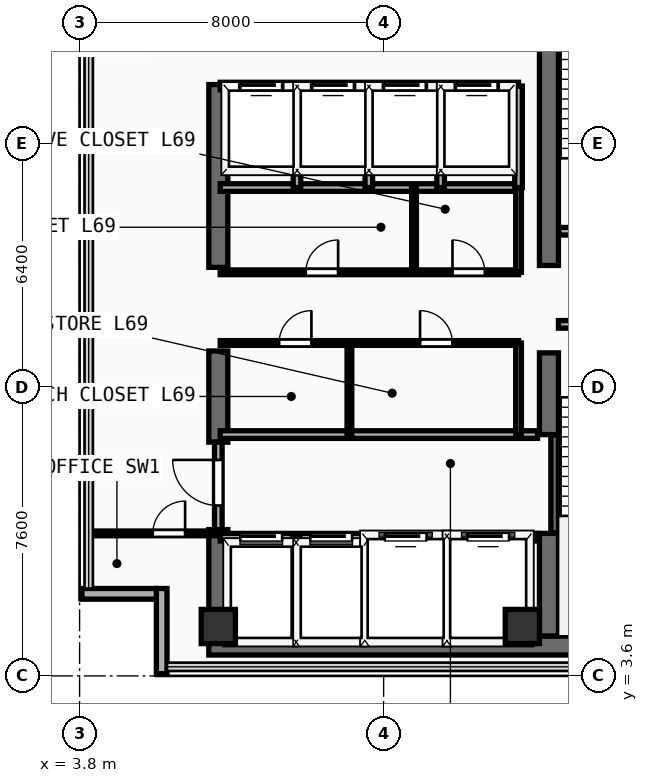
"""IFC4 building model, lengths in metres.
Left out: names, types, materials, properties, quantities, classifications, styles, units other than length and angle.
Written with IfcOpenShell. Run it as: python <this file> out.ifc"""

import sys

from ifc_helpers import new_model, si_unit, direction, frame, frame_2d, origin, origin_2d, place, context, subcontext, project, spatial, rectangle, extrude, element, fill, save


model = new_model("IFC4")
c1 = context("Model", 3, precision=1e-05, world=origin(), true_north=direction((0.0, 1.0)))
c2 = subcontext(c1, "Body", "Model", "MODEL_VIEW")
j1 = project(units=[si_unit("LENGTHUNIT", "METRE"), si_unit("PLANEANGLEUNIT", "RADIAN")], contexts=[c1])
p1 = place(None, origin())
s1 = spatial("IfcSite", under=j1, at=p1, CompositionType="ELEMENT")
p2 = place(p1, origin())
s2 = spatial("IfcBuilding", under=s1, at=p2, CompositionType="ELEMENT")
p3 = place(p2, frame((0.0, 0.0, 270.4)))
s3 = spatial("IfcBuildingStorey", under=s2, at=p3, CompositionType="ELEMENT", Elevation=270.4)
p4 = place(p3, frame((7.2, 4.4, 0.0), z_axis=(0.0, 0.0, 1.0), x_axis=(1.0, 0.0, 0.0)))
e1 = element("IfcWall", 1, at=p4, inside=s3, PredefinedType="SHEAR", context=c2, shape_type="SweptSolid", body=[
    extrude(rectangle(XDim=13.85, YDim=0.5, at=frame_2d((6.925, 0.0))), origin(), (0.0, 0.0, 1.0), 3.56),
])
p5 = place(p3, frame((7.45, 4.65, 0.0), z_axis=(0.0, 0.0, 1.0), x_axis=(0.0, 1.0, 0.0)))
e2 = element("IfcWall", 2, at=p5, inside=s3, PredefinedType="SHEAR", context=c2, shape_type="SweptSolid", body=[
    extrude(rectangle(XDim=2.8, YDim=0.5, at=frame_2d((1.4, 0.0))), origin(), (0.0, 0.0, 1.0), 3.56),
])
p6 = place(p3, frame((7.45, 9.75, 0.0), z_axis=(0.0, 0.0, 1.0), x_axis=(0.0, 1.0, 0.0)))
e3 = element("IfcWall", 3, at=p6, inside=s3, PredefinedType="SHEAR", context=c2, shape_type="SweptSolid", body=[
    extrude(rectangle(XDim=2.4, YDim=0.5, at=frame_2d((1.2, 0.0))), origin(), (0.0, 0.0, 1.0), 3.56),
])
p7 = place(p3, frame((7.45, 14.35, 0.0), z_axis=(0.0, 0.0, 1.0), x_axis=(0.0, 1.0, 0.0)))
e4 = element("IfcWall", 4, at=p7, inside=s3, PredefinedType="SHEAR", context=c2, shape_type="SweptSolid", body=[
    extrude(rectangle(XDim=4.81, YDim=0.5, at=frame_2d((2.405, 0.0))), origin(), (0.0, 0.0, 1.0), 3.56),
])
p8 = place(p3, frame((16.15, 4.65, 0.0), z_axis=(0.0, 0.0, 1.0), x_axis=(0.0, 1.0, 0.0)))
e5 = element("IfcWall", 5, at=p8, inside=s3, PredefinedType="SHEAR", context=c2, shape_type="SweptSolid", body=[
    extrude(rectangle(XDim=2.7, YDim=0.5, at=frame_2d((1.35, 0.0))), origin(), (0.0, 0.0, 1.0), 3.56),
])
p9 = place(p3, frame((16.15, 9.95, 0.0), z_axis=(0.0, 0.0, 1.0), x_axis=(0.0, 1.0, 0.0)))
e6 = element("IfcWall", 6, at=p9, inside=s3, PredefinedType="SHEAR", context=c2, shape_type="SweptSolid", body=[
    extrude(rectangle(XDim=2.15, YDim=0.5, at=frame_2d((1.075, 0.0))), origin(), (0.0, 0.0, 1.0), 3.56),
])
p10 = place(p3, frame((16.15, 14.4, 0.0), z_axis=(0.0, 0.0, 1.0), x_axis=(0.0, 1.0, 0.0)))
e7 = element("IfcWall", 7, at=p10, inside=s3, PredefinedType="SHEAR", context=c2, shape_type="SweptSolid", body=[
    extrude(rectangle(XDim=9.1, YDim=0.5, at=frame_2d((4.55, 0.0))), origin(), (0.0, 0.0, 1.0), 3.56),
])
for number, where, z_axis, x_axis in (
    (8, (7.45, 4.9, 0.0), (0.0, 0.0, 1.0), (1.0, 0.0, 0.0)),
    (9, (15.45, 4.9, 0.0), (0.0, 0.0, 1.0), (1.0, 0.0, 0.0)),
):
    element("IfcColumn", number, at=place(p3, frame(where, z_axis=z_axis, x_axis=x_axis)), inside=s3, PredefinedType="COLUMN", context=c2, shape_type="SweptSolid", body=[
        extrude(rectangle(XDim=0.9, YDim=0.9, at=origin_2d()), origin(), (0.0, 0.0, 1.0), 3.56),
    ])
p11 = place(p3, frame((5.96, 3.66, 0.0), z_axis=(0.0, 0.0, 1.0), x_axis=(0.0, 1.0, 0.0)))
e10 = element("IfcWall", 10, at=p11, inside=s3, PredefinedType="SOLIDWALL", context=c2, shape_type="SweptSolid", body=[
    extrude(rectangle(XDim=2.24, YDim=0.28, at=frame_2d((1.12, 0.0))), origin(), (0.0, 0.0, 1.0), 3.56),
])
p12 = place(p3, frame((3.86, 5.76, 0.0), z_axis=(0.0, 0.0, 1.0), x_axis=(1.0, 0.0, 0.0)))
e11 = element("IfcWall", 11, at=p12, inside=s3, PredefinedType="SOLIDWALL", context=c2, shape_type="SweptSolid", body=[
    extrude(rectangle(XDim=1.96, YDim=0.28, at=frame_2d((0.98, 0.0))), origin(), (0.0, 0.0, 1.0), 3.56),
])
p13 = place(p3, frame((16.3, 7.36, 0.0), z_axis=(0.0, 0.0, 1.0), x_axis=(0.0, 1.0, 0.0)))
e12 = element("IfcWall", 12, at=p13, inside=s3, PredefinedType="SHEAR", context=c2, shape_type="SweptSolid", body=[
    extrude(rectangle(XDim=2.58, YDim=0.2, at=frame_2d((1.29, 0.0))), origin(), (0.0, 0.0, 1.0), 3.56),
])
p14 = place(p3, frame((16.4, 12.85, 0.0), z_axis=(0.0, 0.0, 1.0), x_axis=(1.0, 0.0, 0.0)))
e13 = element("IfcWall", 13, at=p14, inside=s3, PredefinedType="PARTITIONING", context=c2, shape_type="SweptSolid", body=[
    extrude(rectangle(XDim=3.96, YDim=0.2, at=frame_2d((1.98, 0.0))), origin(), (0.0, 0.0, 1.0), 3.56),
])
p15 = place(p14, frame((1.304, 0.0, 0.0)))
e14 = element("IfcOpeningElement", 14, at=p15, cuts=e13, PredefinedType="OPENING", context=c2, shape_type="SweptSolid", body=[
    extrude(rectangle(XDim=1.1, YDim=2.2, at=frame_2d((0.55, 1.1))), frame((0.0, 0.11, 0.0), z_axis=(0.0, -1.0, 0.0), x_axis=(1.0, 0.0, 0.0)), (0.0, 0.0, 1.0), 0.22),
])
p16 = place(p3, frame((16.41, 15.3, 0.0), z_axis=(0.0, 0.0, 1.0), x_axis=(1.0, 0.0, 0.0)))
e15 = element("IfcWall", 15, at=p16, inside=s3, PredefinedType="PARTITIONING", context=c2, shape_type="SweptSolid", body=[
    extrude(rectangle(XDim=3.95, YDim=0.2, at=frame_2d((1.975, 0.0))), origin(), (0.0, 0.0, 1.0), 3.56),
])
p17 = place(p16, frame((1.294, 0.0, 0.0)))
e16 = element("IfcOpeningElement", 16, at=p17, cuts=e15, PredefinedType="OPENING", context=c2, shape_type="SweptSolid", body=[
    extrude(rectangle(XDim=1.1, YDim=2.2, at=frame_2d((0.55, 1.1))), frame((0.0, 0.11, 0.0), z_axis=(0.0, -1.0, 0.0), x_axis=(1.0, 0.0, 0.0)), (0.0, 0.0, 1.0), 0.22),
])
p18 = place(p3, frame((7.5, 7.25, 0.0), z_axis=(0.0, 0.0, 1.0), x_axis=(1.0, 0.0, 0.0)))
e17 = element("IfcWall", 17, at=p18, inside=s3, PredefinedType="PARTITIONING", context=c2, shape_type="SweptSolid", body=[
    extrude(rectangle(XDim=8.35, YDim=0.2, at=frame_2d((4.175, 0.0))), origin(), (0.0, 0.0, 1.0), 3.56),
])
p19 = place(p18, frame((0.53, 0.0, 0.0)))
e18 = element("IfcOpeningElement", 18, at=p19, cuts=e17, PredefinedType="OPENING", context=c2, shape_type="SweptSolid", body=[
    extrude(rectangle(XDim=1.1, YDim=2.2, at=frame_2d((0.55, 1.1))), frame((0.0, 0.11, 0.0), z_axis=(0.0, -1.0, 0.0), x_axis=(1.0, 0.0, 0.0)), (0.0, 0.0, 1.0), 0.22),
])
p20 = place(p18, frame((2.37, 0.0, 0.0)))
e19 = element("IfcOpeningElement", 19, at=p20, cuts=e17, PredefinedType="OPENING", context=c2, shape_type="SweptSolid", body=[
    extrude(rectangle(XDim=1.1, YDim=2.2, at=frame_2d((0.55, 1.1))), frame((0.0, 0.11, 0.0), z_axis=(0.0, -1.0, 0.0), x_axis=(1.0, 0.0, 0.0)), (0.0, 0.0, 1.0), 0.22),
])
p21 = place(p18, frame((4.33, 0.0, 0.0)))
e20 = element("IfcOpeningElement", 20, at=p21, cuts=e17, PredefinedType="OPENING", context=c2, shape_type="SweptSolid", body=[
    extrude(rectangle(XDim=1.1, YDim=2.2, at=frame_2d((0.55, 1.1))), frame((0.0, 0.11, 0.0), z_axis=(0.0, -1.0, 0.0), x_axis=(1.0, 0.0, 0.0)), (0.0, 0.0, 1.0), 0.22),
])
p22 = place(p18, frame((6.5, 0.0, 0.0)))
e21 = element("IfcOpeningElement", 21, at=p22, cuts=e17, PredefinedType="OPENING", context=c2, shape_type="SweptSolid", body=[
    extrude(rectangle(XDim=1.1, YDim=2.2, at=frame_2d((0.55, 1.1))), frame((0.0, 0.11, 0.0), z_axis=(0.0, -1.0, 0.0), x_axis=(1.0, 0.0, 0.0)), (0.0, 0.0, 1.0), 0.22),
])
p23 = place(p3, frame((7.5, 9.95, 0.0), z_axis=(0.0, 0.0, 1.0), x_axis=(1.0, 0.0, 0.0)))
e22 = element("IfcWall", 22, at=p23, inside=s3, PredefinedType="PARTITIONING", context=c2, shape_type="SweptSolid", body=[
    extrude(rectangle(XDim=8.35, YDim=0.2, at=frame_2d((4.175, 0.0))), origin(), (0.0, 0.0, 1.0), 3.56),
])
for number, where, z_axis, x_axis in (
    (23, (9.5, 4.45, 0.0), (0.0, 0.0, 1.0), (0.0, 1.0, 0.0)),
    (24, (11.36, 4.45, 0.0), (0.0, 0.0, 1.0), (0.0, 1.0, 0.0)),
    (25, (13.46, 4.45, 0.0), (0.0, 0.0, 1.0), (0.0, 1.0, 0.0)),
):
    element("IfcWall", number, at=place(p3, frame(where, z_axis=z_axis, x_axis=x_axis)), inside=s3, PredefinedType="PARTITIONING", context=c2, shape_type="SweptSolid", body=[
        extrude(rectangle(XDim=2.8, YDim=0.2, at=frame_2d((1.4, 0.0))), origin(), (0.0, 0.0, 1.0), 3.56),
    ])
p24 = place(p3, frame((7.45, 7.45, 0.0), z_axis=(0.0, 0.0, 1.0), x_axis=(0.0, 1.0, 0.0)))
e26 = element("IfcWall", 26, at=p24, inside=s3, PredefinedType="PARTITIONING", context=c2, shape_type="SweptSolid", body=[
    extrude(rectangle(XDim=2.3, YDim=0.2, at=frame_2d((1.15, 0.0))), origin(), (0.0, 0.0, 1.0), 2.54),
])
p25 = place(p24, frame((0.633, 0.0, 0.0)))
e27 = element("IfcOpeningElement", 27, at=p25, cuts=e26, PredefinedType="OPENING", context=c2, shape_type="SweptSolid", body=[
    extrude(rectangle(XDim=1.2, YDim=2.25, at=frame_2d((0.6, 1.125))), frame((0.0, 0.11, 0.0), z_axis=(0.0, -1.0, 0.0), x_axis=(1.0, 0.0, 0.0)), (0.0, 0.0, 1.0), 0.22),
])
p26 = place(p3, frame((7.5, 16.45, 0.0), z_axis=(0.0, 0.0, 1.0), x_axis=(1.0, 0.0, 0.0)))
e28 = element("IfcWall", 28, at=p26, inside=s3, PredefinedType="PARTITIONING", context=c2, shape_type="SweptSolid", body=[
    extrude(rectangle(XDim=7.85, YDim=0.2, at=frame_2d((3.925, 0.0))), origin(), (0.0, 0.0, 1.0), 3.56),
])
p27 = place(p3, frame((7.5, 12.36, 0.0), z_axis=(0.0, 0.0, 1.0), x_axis=(1.0, 0.0, 0.0)))
e29 = element("IfcWall", 29, at=p27, inside=s3, PredefinedType="PARTITIONING", context=c2, shape_type="SweptSolid", body=[
    extrude(rectangle(XDim=7.85, YDim=0.125, at=frame_2d((3.925, 0.0))), origin(), (0.0, 0.0, 1.0), 3.56),
])
p28 = place(p27, frame((1.55, 0.0, 0.0)))
e30 = element("IfcOpeningElement", 30, at=p28, cuts=e29, PredefinedType="OPENING", context=c2, shape_type="SweptSolid", body=[
    extrude(rectangle(XDim=0.85, YDim=2.15, at=frame_2d((0.425, 1.075))), frame((0.0, 0.073, 0.0), z_axis=(0.0, -1.0, 0.0), x_axis=(1.0, 0.0, 0.0)), (0.0, 0.0, 1.0), 0.145),
])
p29 = place(p27, frame((5.258, 0.0, 0.0)))
e31 = element("IfcOpeningElement", 31, at=p29, cuts=e29, PredefinedType="OPENING", context=c2, shape_type="SweptSolid", body=[
    extrude(rectangle(XDim=0.85, YDim=2.15, at=frame_2d((0.425, 1.075))), frame((0.0, 0.073, 0.0), z_axis=(0.0, -1.0, 0.0), x_axis=(1.0, 0.0, 0.0)), (0.0, 0.0, 1.0), 0.145),
])
p30 = place(p3, frame((7.5, 14.22, 0.0), z_axis=(0.0, 0.0, 1.0), x_axis=(1.0, 0.0, 0.0)))
e32 = element("IfcWall", 32, at=p30, inside=s3, PredefinedType="PARTITIONING", context=c2, shape_type="SweptSolid", body=[
    extrude(rectangle(XDim=7.85, YDim=0.125, at=frame_2d((3.925, 0.0))), origin(), (0.0, 0.0, 1.0), 3.56),
])
p31 = place(p30, frame((2.252, 0.0, 0.0)))
e33 = element("IfcOpeningElement", 33, at=p31, cuts=e32, PredefinedType="OPENING", context=c2, shape_type="SweptSolid", body=[
    extrude(rectangle(XDim=0.85, YDim=2.15, at=frame_2d((0.425, 1.075))), frame((0.0, 0.073, 0.0), z_axis=(0.0, -1.0, 0.0), x_axis=(1.0, 0.0, 0.0)), (0.0, 0.0, 1.0), 0.145),
])
p32 = place(p30, frame((6.111, 0.0, 0.0)))
e34 = element("IfcOpeningElement", 34, at=p32, cuts=e32, PredefinedType="OPENING", context=c2, shape_type="SweptSolid", body=[
    extrude(rectangle(XDim=0.85, YDim=2.15, at=frame_2d((0.425, 1.075))), frame((0.0, 0.073, 0.0), z_axis=(0.0, -1.0, 0.0), x_axis=(1.0, 0.0, 0.0)), (0.0, 0.0, 1.0), 0.145),
])
p33 = place(p3, frame((15.35, 9.95, 0.0), z_axis=(0.0, 0.0, 1.0), x_axis=(0.0, 1.0, 0.0)))
e35 = element("IfcWall", 35, at=p33, inside=s3, PredefinedType="PARTITIONING", context=c2, shape_type="SweptSolid", body=[
    extrude(rectangle(XDim=2.41, YDim=0.15, at=frame_2d((1.205, 0.0))), origin(), (0.0, 0.0, 1.0), 3.56),
])
p34 = place(p3, frame((15.35, 14.22, 0.0), z_axis=(0.0, 0.0, 1.0), x_axis=(0.0, 1.0, 0.0)))
e36 = element("IfcWall", 36, at=p34, inside=s3, PredefinedType="PARTITIONING", context=c2, shape_type="SweptSolid", body=[
    extrude(rectangle(XDim=2.23, YDim=0.15, at=frame_2d((1.115, 0.0))), origin(), (0.0, 0.0, 1.0), 3.56),
])
p35 = place(p3, frame((10.9, 9.95, 0.0), z_axis=(0.0, 0.0, 1.0), x_axis=(0.0, 1.0, 0.0)))
e37 = element("IfcWall", 37, at=p35, inside=s3, PredefinedType="PARTITIONING", context=c2, shape_type="SweptSolid", body=[
    extrude(rectangle(XDim=2.41, YDim=0.125, at=frame_2d((1.205, 0.0))), origin(), (0.0, 0.0, 1.0), 3.56),
])
p36 = place(p3, frame((12.6, 14.22, 0.0), z_axis=(0.0, 0.0, 1.0), x_axis=(0.0, 1.0, 0.0)))
e38 = element("IfcWall", 38, at=p36, inside=s3, PredefinedType="PARTITIONING", context=c2, shape_type="SweptSolid", body=[
    extrude(rectangle(XDim=2.23, YDim=0.125, at=frame_2d((1.115, 0.0))), origin(), (0.0, 0.0, 1.0), 3.56),
])
p37 = place(p3, frame((7.5, 19.12, 0.0), z_axis=(0.0, 0.0, 1.0), x_axis=(1.0, 0.0, 0.0)))
e39 = element("IfcWall", 39, at=p37, inside=s3, PredefinedType="PARTITIONING", context=c2, shape_type="SweptSolid", body=[
    extrude(rectangle(XDim=7.85, YDim=0.2, at=frame_2d((3.925, 0.0))), origin(), (0.0, 0.0, 1.0), 3.56),
])
p38 = place(p37, frame((0.53, 0.0, 0.0)))
e40 = element("IfcOpeningElement", 40, at=p38, cuts=e39, PredefinedType="OPENING", context=c2, shape_type="SweptSolid", body=[
    extrude(rectangle(XDim=1.1, YDim=2.2, at=frame_2d((0.55, 1.1))), frame((0.0, 0.11, 0.0), z_axis=(0.0, -1.0, 0.0), x_axis=(1.0, 0.0, 0.0)), (0.0, 0.0, 1.0), 0.22),
])
p39 = place(p37, frame((2.42, 0.0, 0.0)))
e41 = element("IfcOpeningElement", 41, at=p39, cuts=e39, PredefinedType="OPENING", context=c2, shape_type="SweptSolid", body=[
    extrude(rectangle(XDim=1.1, YDim=2.2, at=frame_2d((0.55, 1.1))), frame((0.0, 0.11, 0.0), z_axis=(0.0, -1.0, 0.0), x_axis=(1.0, 0.0, 0.0)), (0.0, 0.0, 1.0), 0.22),
])
p40 = place(p37, frame((4.31, 0.0, 0.0)))
e42 = element("IfcOpeningElement", 42, at=p40, cuts=e39, PredefinedType="OPENING", context=c2, shape_type="SweptSolid", body=[
    extrude(rectangle(XDim=1.1, YDim=2.2, at=frame_2d((0.55, 1.1))), frame((0.0, 0.11, 0.0), z_axis=(0.0, -1.0, 0.0), x_axis=(1.0, 0.0, 0.0)), (0.0, 0.0, 1.0), 0.22),
])
p41 = place(p37, frame((6.2, 0.0, 0.0)))
e43 = element("IfcOpeningElement", 43, at=p41, cuts=e39, PredefinedType="OPENING", context=c2, shape_type="SweptSolid", body=[
    extrude(rectangle(XDim=1.1, YDim=2.2, at=frame_2d((0.55, 1.1))), frame((0.0, 0.11, 0.0), z_axis=(0.0, -1.0, 0.0), x_axis=(1.0, 0.0, 0.0)), (0.0, 0.0, 1.0), 0.22),
])
for number, where, z_axis, x_axis in (
    (44, (15.35, 16.45, 0.0), (0.0, 0.0, 1.0), (0.0, 1.0, 0.0)),
    (45, (9.52, 16.45, 0.0), (0.0, 0.0, 1.0), (0.0, 1.0, 0.0)),
    (46, (11.41, 16.45, 0.0), (0.0, 0.0, 1.0), (0.0, 1.0, 0.0)),
    (47, (13.3, 16.45, 0.0), (0.0, 0.0, 1.0), (0.0, 1.0, 0.0)),
):
    element("IfcWall", number, at=place(p3, frame(where, z_axis=z_axis, x_axis=x_axis)), inside=s3, PredefinedType="PARTITIONING", context=c2, shape_type="SweptSolid", body=[
        extrude(rectangle(XDim=2.67, YDim=0.2, at=frame_2d((1.335, 0.0))), origin(), (0.0, 0.0, 1.0), 3.56),
    ])
p42 = place(p3, frame((4.04, 7.35, 0.0), z_axis=(0.0, 0.0, 1.0), x_axis=(1.0, 0.0, 0.0)))
e48 = element("IfcWall", 48, at=p42, inside=s3, PredefinedType="PARTITIONING", context=c2, shape_type="SweptSolid", body=[
    extrude(rectangle(XDim=3.36, YDim=0.125, at=frame_2d((1.68, 0.0))), origin(), (0.0, 0.0, 1.0), 3.56),
])
p43 = place(p42, frame((1.687, 0.0, 0.0)))
e49 = element("IfcOpeningElement", 49, at=p43, cuts=e48, PredefinedType="OPENING", context=c2, shape_type="SweptSolid", body=[
    extrude(rectangle(XDim=0.85, YDim=2.15, at=frame_2d((0.425, 1.075))), frame((0.0, 0.073, 0.0), z_axis=(0.0, -1.0, 0.0), x_axis=(1.0, 0.0, 0.0)), (0.0, 0.0, 1.0), 0.145),
])
p44 = place(p19, origin())
e50 = element("IfcDoor", 50, at=p44, inside=s3, OperationType="SLIDING_TO_LEFT", PredefinedType="DOOR", context=c2, shape_type="SweptSolid", body=[
    extrude(rectangle(XDim=1.1, YDim=2.2, at=frame_2d((0.55, 1.1))), frame((0.0, 0.025, 0.0), z_axis=(0.0, -1.0, 0.0), x_axis=(1.0, 0.0, 0.0)), (0.0, 0.0, 1.0), 0.05),
])
fill(e18, e50)
p45 = place(p20, origin())
e51 = element("IfcDoor", 51, at=p45, inside=s3, OperationType="SLIDING_TO_LEFT", PredefinedType="DOOR", context=c2, shape_type="SweptSolid", body=[
    extrude(rectangle(XDim=1.1, YDim=2.2, at=frame_2d((0.55, 1.1))), frame((0.0, 0.025, 0.0), z_axis=(0.0, -1.0, 0.0), x_axis=(1.0, 0.0, 0.0)), (0.0, 0.0, 1.0), 0.05),
])
fill(e19, e51)
p46 = place(p21, origin())
e52 = element("IfcDoor", 52, at=p46, inside=s3, OperationType="SLIDING_TO_LEFT", PredefinedType="DOOR", context=c2, shape_type="SweptSolid", body=[
    extrude(rectangle(XDim=1.1, YDim=2.2, at=frame_2d((0.55, 1.1))), frame((0.0, 0.025, 0.0), z_axis=(0.0, -1.0, 0.0), x_axis=(1.0, 0.0, 0.0)), (0.0, 0.0, 1.0), 0.05),
])
fill(e20, e52)
p47 = place(p22, origin())
e53 = element("IfcDoor", 53, at=p47, inside=s3, OperationType="SLIDING_TO_LEFT", PredefinedType="DOOR", context=c2, shape_type="SweptSolid", body=[
    extrude(rectangle(XDim=1.1, YDim=2.2, at=frame_2d((0.55, 1.1))), frame((0.0, 0.025, 0.0), z_axis=(0.0, -1.0, 0.0), x_axis=(1.0, 0.0, 0.0)), (0.0, 0.0, 1.0), 0.05),
])
fill(e21, e53)
p48 = place(p25, frame((1.2, 0.0, 0.0), z_axis=(0.0, 0.0, 1.0), x_axis=(-1.0, 0.0, 0.0)))
e54 = element("IfcDoor", 54, at=p48, inside=s3, OperationType="SINGLE_SWING_LEFT", PredefinedType="DOOR", context=c2, shape_type="SweptSolid", body=[
    extrude(rectangle(XDim=1.2, YDim=2.25, at=frame_2d((0.6, 1.125))), frame((0.0, 0.025, 0.0), z_axis=(0.0, -1.0, 0.0), x_axis=(1.0, 0.0, 0.0)), (0.0, 0.0, 1.0), 0.05),
])
fill(e27, e54)
p49 = place(p28, origin())
e55 = element("IfcDoor", 55, at=p49, inside=s3, OperationType="SINGLE_SWING_RIGHT", PredefinedType="DOOR", context=c2, shape_type="SweptSolid", body=[
    extrude(rectangle(XDim=0.85, YDim=2.15, at=frame_2d((0.425, 1.075))), frame((0.0, 0.025, 0.0), z_axis=(0.0, -1.0, 0.0), x_axis=(1.0, 0.0, 0.0)), (0.0, 0.0, 1.0), 0.05),
])
fill(e30, e55)
p50 = place(p29, origin())
e56 = element("IfcDoor", 56, at=p50, inside=s3, OperationType="SINGLE_SWING_LEFT", PredefinedType="DOOR", context=c2, shape_type="SweptSolid", body=[
    extrude(rectangle(XDim=0.85, YDim=2.15, at=frame_2d((0.425, 1.075))), frame((0.0, 0.025, 0.0), z_axis=(0.0, -1.0, 0.0), x_axis=(1.0, 0.0, 0.0)), (0.0, 0.0, 1.0), 0.05),
])
fill(e31, e56)
p51 = place(p31, origin())
e57 = element("IfcDoor", 57, at=p51, inside=s3, OperationType="SINGLE_SWING_RIGHT", PredefinedType="DOOR", context=c2, shape_type="SweptSolid", body=[
    extrude(rectangle(XDim=0.85, YDim=2.15, at=frame_2d((0.425, 1.075))), frame((0.0, 0.025, 0.0), z_axis=(0.0, -1.0, 0.0), x_axis=(1.0, 0.0, 0.0)), (0.0, 0.0, 1.0), 0.05),
])
fill(e33, e57)
p52 = place(p32, origin())
e58 = element("IfcDoor", 58, at=p52, inside=s3, OperationType="SINGLE_SWING_LEFT", PredefinedType="DOOR", context=c2, shape_type="SweptSolid", body=[
    extrude(rectangle(XDim=0.85, YDim=2.15, at=frame_2d((0.425, 1.075))), frame((0.0, 0.025, 0.0), z_axis=(0.0, -1.0, 0.0), x_axis=(1.0, 0.0, 0.0)), (0.0, 0.0, 1.0), 0.05),
])
fill(e34, e58)
p53 = place(p38, origin())
e59 = element("IfcDoor", 59, at=p53, inside=s3, OperationType="SLIDING_TO_LEFT", PredefinedType="DOOR", context=c2, shape_type="SweptSolid", body=[
    extrude(rectangle(XDim=1.1, YDim=2.2, at=frame_2d((0.55, 1.1))), frame((0.0, 0.025, 0.0), z_axis=(0.0, -1.0, 0.0), x_axis=(1.0, 0.0, 0.0)), (0.0, 0.0, 1.0), 0.05),
])
fill(e40, e59)
p54 = place(p39, origin())
e60 = element("IfcDoor", 60, at=p54, inside=s3, OperationType="SLIDING_TO_LEFT", PredefinedType="DOOR", context=c2, shape_type="SweptSolid", body=[
    extrude(rectangle(XDim=1.1, YDim=2.2, at=frame_2d((0.55, 1.1))), frame((0.0, 0.025, 0.0), z_axis=(0.0, -1.0, 0.0), x_axis=(1.0, 0.0, 0.0)), (0.0, 0.0, 1.0), 0.05),
])
fill(e41, e60)
p55 = place(p40, origin())
e61 = element("IfcDoor", 61, at=p55, inside=s3, OperationType="SLIDING_TO_LEFT", PredefinedType="DOOR", context=c2, shape_type="SweptSolid", body=[
    extrude(rectangle(XDim=1.1, YDim=2.2, at=frame_2d((0.55, 1.1))), frame((0.0, 0.025, 0.0), z_axis=(0.0, -1.0, 0.0), x_axis=(1.0, 0.0, 0.0)), (0.0, 0.0, 1.0), 0.05),
])
fill(e42, e61)
p56 = place(p41, origin())
e62 = element("IfcDoor", 62, at=p56, inside=s3, OperationType="SLIDING_TO_LEFT", PredefinedType="DOOR", context=c2, shape_type="SweptSolid", body=[
    extrude(rectangle(XDim=1.1, YDim=2.2, at=frame_2d((0.55, 1.1))), frame((0.0, 0.025, 0.0), z_axis=(0.0, -1.0, 0.0), x_axis=(1.0, 0.0, 0.0)), (0.0, 0.0, 1.0), 0.05),
])
fill(e43, e62)
p57 = place(p43, origin())
e63 = element("IfcDoor", 63, at=p57, inside=s3, OperationType="SINGLE_SWING_RIGHT", PredefinedType="DOOR", context=c2, shape_type="SweptSolid", body=[
    extrude(rectangle(XDim=0.85, YDim=2.15, at=frame_2d((0.425, 1.075))), frame((0.0, 0.025, 0.0), z_axis=(0.0, -1.0, 0.0), x_axis=(1.0, 0.0, 0.0)), (0.0, 0.0, 1.0), 0.05),
])
fill(e49, e63)
save(model, sys.argv[1])
